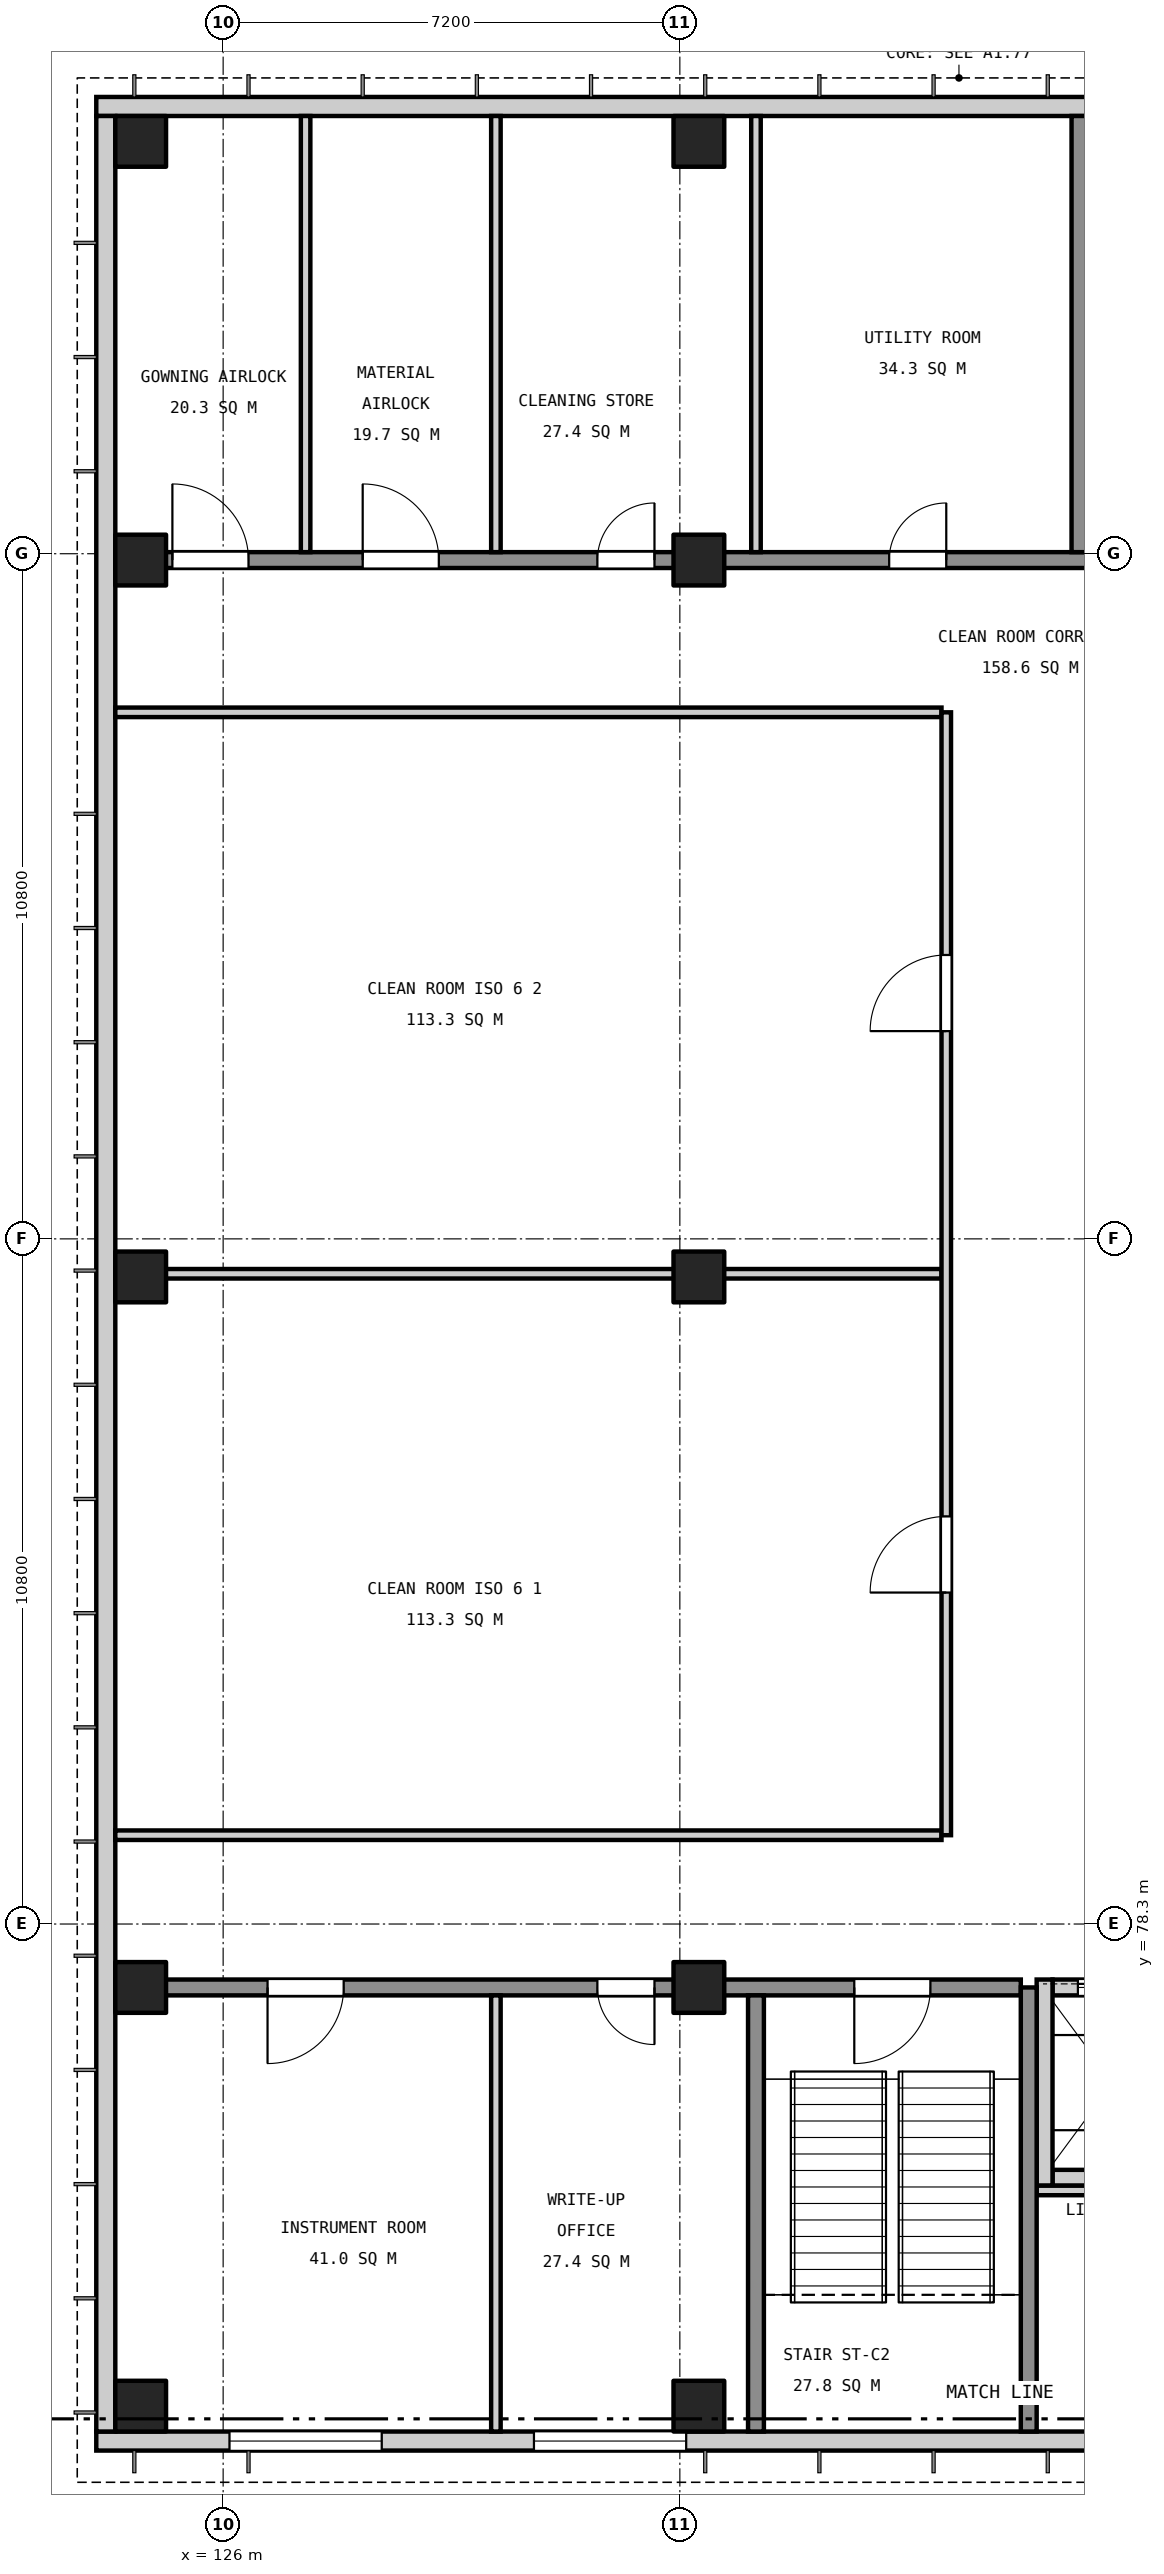
"""IFC4 building model, lengths in metres.
Left out: names, types, materials, properties, quantities, classifications, styles, units other than length and angle.
Written with IfcOpenShell. Run it as: python <this file> out.ifc"""

import sys

from ifc_helpers import new_model, si_unit, direction, frame, frame_2d, origin, origin_2d, place, context, subcontext, project, spatial, rectangle, extrude, element, fill, save


model = new_model("IFC4")
c1 = context("Model", 3, precision=1e-05, world=origin(), true_north=direction((0.0, 1.0)))
c2 = subcontext(c1, "Body", "Model", "MODEL_VIEW")
j1 = project(units=[si_unit("LENGTHUNIT", "METRE"), si_unit("PLANEANGLEUNIT", "RADIAN")], contexts=[c1])
p1 = place(None, origin())
s1 = spatial("IfcSite", under=j1, at=p1, CompositionType="ELEMENT")
p2 = place(p1, origin())
s2 = spatial("IfcBuilding", under=s1, at=p2, CompositionType="ELEMENT")
p3 = place(p2, frame((0.0, 0.0, 6.0)))
s3 = spatial("IfcBuildingStorey", under=s2, at=p3, CompositionType="ELEMENT", Elevation=6.0)
p4 = place(p3, frame((139.075, 74.3, 0.0), z_axis=(0.0, 0.0, 1.0), x_axis=(1.0, 0.0, 0.0)))
e1 = element("IfcWall", 1, at=p4, inside=s3, PredefinedType="SOLIDWALL", context=c2, shape_type="SweptSolid", body=[
    extrude(rectangle(XDim=1.9, YDim=0.25, at=frame_2d((0.95, 0.0))), origin(), (0.0, 0.0, 1.0), 4.95),
])
p5 = place(p3, frame((139.075, 77.3, 0.0), z_axis=(0.0, 0.0, 1.0), x_axis=(1.0, 0.0, 0.0)))
e2 = element("IfcWall", 2, at=p5, inside=s3, PredefinedType="SOLIDWALL", context=c2, shape_type="SweptSolid", body=[
    extrude(rectangle(XDim=1.9, YDim=0.25, at=frame_2d((0.95, 0.0))), origin(), (0.0, 0.0, 1.0), 4.95),
])
p6 = place(p5, frame((0.4, 0.0, 0.0)))
e3 = element("IfcOpeningElement", 3, at=p6, cuts=e2, PredefinedType="OPENING", context=c2, shape_type="SweptSolid", body=[
    extrude(rectangle(XDim=1.1, YDim=2.1, at=frame_2d((0.55, 1.05))), frame((0.0, 0.135, 0.0), z_axis=(0.0, -1.0, 0.0), x_axis=(1.0, 0.0, 0.0)), (0.0, 0.0, 1.0), 0.27),
])
p7 = place(p3, frame((138.95, 74.175, 0.0), z_axis=(0.0, 0.0, 1.0), x_axis=(0.0, 1.0, 0.0)))
e4 = element("IfcWall", 4, at=p7, inside=s3, PredefinedType="SOLIDWALL", context=c2, shape_type="SweptSolid", body=[
    extrude(rectangle(XDim=3.25, YDim=0.25, at=frame_2d((1.625, 0.0))), origin(), (0.0, 0.0, 1.0), 4.95),
])
for number, where, z_axis, x_axis in (
    (5, (124.7, 70.7, 0.0), (0.0, 0.0, 1.0), (1.0, 0.0, 0.0)),
    (6, (124.7, 77.3, 0.0), (0.0, 0.0, 1.0), (1.0, 0.0, 0.0)),
    (7, (124.7, 88.5, 0.0), (0.0, 0.0, 1.0), (1.0, 0.0, 0.0)),
    (8, (124.7, 99.8, 0.0), (0.0, 0.0, 1.0), (1.0, 0.0, 0.0)),
    (9, (124.7, 106.4, 0.0), (0.0, 0.0, 1.0), (1.0, 0.0, 0.0)),
    (10, (133.5, 70.7, 0.0), (0.0, 0.0, 1.0), (1.0, 0.0, 0.0)),
    (11, (133.5, 77.3, 0.0), (0.0, 0.0, 1.0), (1.0, 0.0, 0.0)),
    (12, (133.5, 88.5, 0.0), (0.0, 0.0, 1.0), (1.0, 0.0, 0.0)),
    (13, (133.5, 99.8, 0.0), (0.0, 0.0, 1.0), (1.0, 0.0, 0.0)),
    (14, (133.5, 106.4, 0.0), (0.0, 0.0, 1.0), (1.0, 0.0, 0.0)),
):
    element("IfcColumn", number, at=place(p3, frame(where, z_axis=z_axis, x_axis=x_axis)), inside=s3, PredefinedType="COLUMN", context=c2, shape_type="SweptSolid", body=[
        extrude(rectangle(XDim=0.8, YDim=0.8, at=origin_2d()), origin(), (0.0, 0.0, 1.0), 5.4),
    ])
p8 = place(p3, frame((124.0, 70.15, 0.0), z_axis=(0.0, 0.0, 1.0), x_axis=(1.0, 0.0, 0.0)))
e15 = element("IfcWall", 15, at=p8, inside=s3, PredefinedType="SOLIDWALL", context=c2, shape_type="SweptSolid", body=[
    extrude(rectangle(XDim=27.2, YDim=0.3, at=frame_2d((13.6, 0.0))), origin(), (0.0, 0.0, 1.0), 4.95),
])
p9 = place(p8, frame((2.1, 0.0, 0.9)))
e16 = element("IfcOpeningElement", 16, at=p9, cuts=e15, PredefinedType="OPENING", context=c2, shape_type="SweptSolid", body=[
    extrude(rectangle(XDim=2.4, YDim=1.8, at=frame_2d((1.2, 0.9))), frame((0.0, 0.16, 0.0), z_axis=(0.0, -1.0, 0.0), x_axis=(1.0, 0.0, 0.0)), (0.0, 0.0, 1.0), 0.32),
])
p10 = place(p8, frame((6.9, 0.0, 0.9)))
e17 = element("IfcOpeningElement", 17, at=p10, cuts=e15, PredefinedType="OPENING", context=c2, shape_type="SweptSolid", body=[
    extrude(rectangle(XDim=2.4, YDim=1.8, at=frame_2d((1.2, 0.9))), frame((0.0, 0.16, 0.0), z_axis=(0.0, -1.0, 0.0), x_axis=(1.0, 0.0, 0.0)), (0.0, 0.0, 1.0), 0.32),
])
p11 = place(p8, frame((20.6, 0.0, 0.9)))
e18 = element("IfcOpeningElement", 18, at=p11, cuts=e15, PredefinedType="OPENING", context=c2, shape_type="SweptSolid", body=[
    extrude(rectangle(XDim=2.4, YDim=1.8, at=frame_2d((1.2, 0.9))), frame((0.0, 0.16, 0.0), z_axis=(0.0, -1.0, 0.0), x_axis=(1.0, 0.0, 0.0)), (0.0, 0.0, 1.0), 0.32),
])
p12 = place(p3, frame((124.0, 106.95, 0.0), z_axis=(0.0, 0.0, 1.0), x_axis=(1.0, 0.0, 0.0)))
e19 = element("IfcWall", 19, at=p12, inside=s3, PredefinedType="SOLIDWALL", context=c2, shape_type="SweptSolid", body=[
    extrude(rectangle(XDim=27.2, YDim=0.3, at=frame_2d((13.6, 0.0))), origin(), (0.0, 0.0, 1.0), 4.95),
])
p13 = place(p3, frame((124.15, 70.3, 0.0), z_axis=(0.0, 0.0, 1.0), x_axis=(0.0, 1.0, 0.0)))
e20 = element("IfcWall", 20, at=p13, inside=s3, PredefinedType="SOLIDWALL", context=c2, shape_type="SweptSolid", body=[
    extrude(rectangle(XDim=36.5, YDim=0.3, at=frame_2d((18.25, 0.0))), origin(), (0.0, 0.0, 1.0), 4.95),
])
p14 = place(p3, frame((138.825, 74.1, 0.0), z_axis=(0.0, 0.0, 1.0), x_axis=(1.0, 0.0, 0.0)))
e21 = element("IfcWall", 21, at=p14, inside=s3, PredefinedType="SOLIDWALL", context=c2, shape_type="SweptSolid", body=[
    extrude(rectangle(XDim=4.9, YDim=0.15, at=frame_2d((2.45, 0.0))), origin(), (0.0, 0.0, 1.0), 4.95),
])
p15 = place(p3, frame((124.3, 77.3, 0.0), z_axis=(0.0, 0.0, 1.0), x_axis=(1.0, 0.0, 0.0)))
e22 = element("IfcWall", 22, at=p15, inside=s3, PredefinedType="SOLIDWALL", context=c2, shape_type="SweptSolid", body=[
    extrude(rectangle(XDim=14.275, YDim=0.25, at=frame_2d((7.137, 0.0))), origin(), (0.0, 0.0, 1.0), 4.95),
])
p16 = place(p15, frame((2.4, 0.0, 0.0)))
e23 = element("IfcOpeningElement", 23, at=p16, cuts=e22, PredefinedType="OPENING", context=c2, shape_type="SweptSolid", body=[
    extrude(rectangle(XDim=1.2, YDim=2.1, at=frame_2d((0.6, 1.05))), frame((0.0, 0.135, 0.0), z_axis=(0.0, -1.0, 0.0), x_axis=(1.0, 0.0, 0.0)), (0.0, 0.0, 1.0), 0.27),
])
p17 = place(p15, frame((7.6, 0.0, 0.0)))
e24 = element("IfcOpeningElement", 24, at=p17, cuts=e22, PredefinedType="OPENING", context=c2, shape_type="SweptSolid", body=[
    extrude(rectangle(XDim=0.9, YDim=2.1, at=frame_2d((0.45, 1.05))), frame((0.0, 0.135, 0.0), z_axis=(0.0, -1.0, 0.0), x_axis=(1.0, 0.0, 0.0)), (0.0, 0.0, 1.0), 0.27),
])
p18 = place(p15, frame((11.65, 0.0, 0.0)))
e25 = element("IfcOpeningElement", 25, at=p18, cuts=e22, PredefinedType="OPENING", context=c2, shape_type="SweptSolid", body=[
    extrude(rectangle(XDim=1.2, YDim=2.1, at=frame_2d((0.6, 1.05))), frame((0.0, 0.135, 0.0), z_axis=(0.0, -1.0, 0.0), x_axis=(1.0, 0.0, 0.0)), (0.0, 0.0, 1.0), 0.27),
])
for number, where, z_axis, x_axis in (
    (26, (124.3, 79.7, 0.0), (0.0, 0.0, 1.0), (1.0, 0.0, 0.0)),
    (27, (124.3, 88.55, 0.0), (0.0, 0.0, 1.0), (1.0, 0.0, 0.0)),
    (28, (124.3, 97.4, 0.0), (0.0, 0.0, 1.0), (1.0, 0.0, 0.0)),
):
    element("IfcWall", number, at=place(p3, frame(where, z_axis=z_axis, x_axis=x_axis)), inside=s3, PredefinedType="SOLIDWALL", context=c2, shape_type="SweptSolid", body=[
        extrude(rectangle(XDim=13.025, YDim=0.15, at=frame_2d((6.512, 0.0))), origin(), (0.0, 0.0, 1.0), 4.95),
    ])
p19 = place(p3, frame((124.3, 99.8, 0.0), z_axis=(0.0, 0.0, 1.0), x_axis=(1.0, 0.0, 0.0)))
e29 = element("IfcWall", 29, at=p19, inside=s3, PredefinedType="SOLIDWALL", context=c2, shape_type="SweptSolid", body=[
    extrude(rectangle(XDim=26.6, YDim=0.25, at=frame_2d((13.3, 0.0))), origin(), (0.0, 0.0, 1.0), 4.95),
])
p20 = place(p19, frame((0.9, 0.0, 0.0)))
e30 = element("IfcOpeningElement", 30, at=p20, cuts=e29, PredefinedType="OPENING", context=c2, shape_type="SweptSolid", body=[
    extrude(rectangle(XDim=1.2, YDim=2.1, at=frame_2d((0.6, 1.05))), frame((0.0, 0.135, 0.0), z_axis=(0.0, -1.0, 0.0), x_axis=(1.0, 0.0, 0.0)), (0.0, 0.0, 1.0), 0.27),
])
p21 = place(p19, frame((3.9, 0.0, 0.0)))
e31 = element("IfcOpeningElement", 31, at=p21, cuts=e29, PredefinedType="OPENING", context=c2, shape_type="SweptSolid", body=[
    extrude(rectangle(XDim=1.2, YDim=2.1, at=frame_2d((0.6, 1.05))), frame((0.0, 0.135, 0.0), z_axis=(0.0, -1.0, 0.0), x_axis=(1.0, 0.0, 0.0)), (0.0, 0.0, 1.0), 0.27),
])
p22 = place(p19, frame((7.6, 0.0, 0.0)))
e32 = element("IfcOpeningElement", 32, at=p22, cuts=e29, PredefinedType="OPENING", context=c2, shape_type="SweptSolid", body=[
    extrude(rectangle(XDim=0.9, YDim=2.1, at=frame_2d((0.45, 1.05))), frame((0.0, 0.135, 0.0), z_axis=(0.0, -1.0, 0.0), x_axis=(1.0, 0.0, 0.0)), (0.0, 0.0, 1.0), 0.27),
])
p23 = place(p19, frame((20.8, 0.0, 0.0)))
e33 = element("IfcOpeningElement", 33, at=p23, cuts=e29, PredefinedType="OPENING", context=c2, shape_type="SweptSolid", body=[
    extrude(rectangle(XDim=0.9, YDim=2.1, at=frame_2d((0.45, 1.05))), frame((0.0, 0.135, 0.0), z_axis=(0.0, -1.0, 0.0), x_axis=(1.0, 0.0, 0.0)), (0.0, 0.0, 1.0), 0.27),
])
p24 = place(p19, frame((24.35, 0.0, 0.0)))
e34 = element("IfcOpeningElement", 34, at=p24, cuts=e29, PredefinedType="OPENING", context=c2, shape_type="SweptSolid", body=[
    extrude(rectangle(XDim=0.9, YDim=2.1, at=frame_2d((0.45, 1.05))), frame((0.0, 0.135, 0.0), z_axis=(0.0, -1.0, 0.0), x_axis=(1.0, 0.0, 0.0)), (0.0, 0.0, 1.0), 0.27),
])
p25 = place(p19, frame((12.2, 0.0, 0.0)))
e35 = element("IfcOpeningElement", 35, at=p25, cuts=e29, PredefinedType="OPENING", context=c2, shape_type="SweptSolid", body=[
    extrude(rectangle(XDim=0.9, YDim=2.1, at=frame_2d((0.45, 1.05))), frame((0.0, 0.135, 0.0), z_axis=(0.0, -1.0, 0.0), x_axis=(1.0, 0.0, 0.0)), (0.0, 0.0, 1.0), 0.27),
])
p26 = place(p19, frame((16.75, 0.0, 0.0)))
e36 = element("IfcOpeningElement", 36, at=p26, cuts=e29, PredefinedType="OPENING", context=c2, shape_type="SweptSolid", body=[
    extrude(rectangle(XDim=1.2, YDim=2.1, at=frame_2d((0.6, 1.05))), frame((0.0, 0.135, 0.0), z_axis=(0.0, -1.0, 0.0), x_axis=(1.0, 0.0, 0.0)), (0.0, 0.0, 1.0), 0.27),
])
for number, where, z_axis, x_axis in (
    (37, (127.3, 99.925, 0.0), (0.0, 0.0, 1.0), (0.0, 1.0, 0.0)),
    (38, (130.3, 70.3, 0.0), (0.0, 0.0, 1.0), (0.0, 1.0, 0.0)),
    (39, (130.3, 99.925, 0.0), (0.0, 0.0, 1.0), (0.0, 1.0, 0.0)),
):
    element("IfcWall", number, at=place(p3, frame(where, z_axis=z_axis, x_axis=x_axis)), inside=s3, PredefinedType="SOLIDWALL", context=c2, shape_type="SweptSolid", body=[
        extrude(rectangle(XDim=6.875, YDim=0.15, at=frame_2d((3.438, 0.0))), origin(), (0.0, 0.0, 1.0), 4.95),
    ])
p27 = place(p3, frame((134.4, 70.3, 0.0), z_axis=(0.0, 0.0, 1.0), x_axis=(0.0, 1.0, 0.0)))
e40 = element("IfcWall", 40, at=p27, inside=s3, PredefinedType="SOLIDWALL", context=c2, shape_type="SweptSolid", body=[
    extrude(rectangle(XDim=6.875, YDim=0.25, at=frame_2d((3.438, 0.0))), origin(), (0.0, 0.0, 1.0), 4.95),
])
p28 = place(p3, frame((134.4, 99.925, 0.0), z_axis=(0.0, 0.0, 1.0), x_axis=(0.0, 1.0, 0.0)))
e41 = element("IfcWall", 41, at=p28, inside=s3, PredefinedType="SOLIDWALL", context=c2, shape_type="SweptSolid", body=[
    extrude(rectangle(XDim=6.875, YDim=0.15, at=frame_2d((3.438, 0.0))), origin(), (0.0, 0.0, 1.0), 4.95),
])
p29 = place(p3, frame((137.4, 79.7, 0.0), z_axis=(0.0, 0.0, 1.0), x_axis=(0.0, 1.0, 0.0)))
e42 = element("IfcWall", 42, at=p29, inside=s3, PredefinedType="SOLIDWALL", context=c2, shape_type="SweptSolid", body=[
    extrude(rectangle(XDim=17.7, YDim=0.15, at=frame_2d((8.85, 0.0))), origin(), (0.0, 0.0, 1.0), 4.95),
])
p30 = place(p29, frame((3.825, 0.0, 0.0)))
e43 = element("IfcOpeningElement", 43, at=p30, cuts=e42, PredefinedType="OPENING", context=c2, shape_type="SweptSolid", body=[
    extrude(rectangle(XDim=1.2, YDim=2.1, at=frame_2d((0.6, 1.05))), frame((0.0, 0.085, 0.0), z_axis=(0.0, -1.0, 0.0), x_axis=(1.0, 0.0, 0.0)), (0.0, 0.0, 1.0), 0.17),
])
p31 = place(p29, frame((12.675, 0.0, 0.0)))
e44 = element("IfcOpeningElement", 44, at=p31, cuts=e42, PredefinedType="OPENING", context=c2, shape_type="SweptSolid", body=[
    extrude(rectangle(XDim=1.2, YDim=2.1, at=frame_2d((0.6, 1.05))), frame((0.0, 0.085, 0.0), z_axis=(0.0, -1.0, 0.0), x_axis=(1.0, 0.0, 0.0)), (0.0, 0.0, 1.0), 0.17),
])
p32 = place(p3, frame((138.7, 70.3, 0.0), z_axis=(0.0, 0.0, 1.0), x_axis=(0.0, 1.0, 0.0)))
e45 = element("IfcWall", 45, at=p32, inside=s3, PredefinedType="SOLIDWALL", context=c2, shape_type="SweptSolid", body=[
    extrude(rectangle(XDim=7.0, YDim=0.25, at=frame_2d((3.5, 0.0))), origin(), (0.0, 0.0, 1.0), 4.95),
])
p33 = place(p3, frame((139.5, 99.925, 0.0), z_axis=(0.0, 0.0, 1.0), x_axis=(0.0, 1.0, 0.0)))
e46 = element("IfcWall", 46, at=p33, inside=s3, PredefinedType="SOLIDWALL", context=c2, shape_type="SweptSolid", body=[
    extrude(rectangle(XDim=6.875, YDim=0.25, at=frame_2d((3.438, 0.0))), origin(), (0.0, 0.0, 1.0), 4.95),
])
p34 = place(p16, frame((1.2, 0.0, 0.0), z_axis=(0.0, 0.0, 1.0), x_axis=(-1.0, 0.0, 0.0)))
e47 = element("IfcDoor", 47, at=p34, inside=s3, OperationType="SINGLE_SWING_RIGHT", PredefinedType="DOOR", context=c2, shape_type="SweptSolid", body=[
    extrude(rectangle(XDim=1.2, YDim=2.1, at=frame_2d((0.6, 1.05))), frame((0.0, 0.025, 0.0), z_axis=(0.0, -1.0, 0.0), x_axis=(1.0, 0.0, 0.0)), (0.0, 0.0, 1.0), 0.05),
])
fill(e23, e47)
p35 = place(p17, frame((0.9, 0.0, 0.0), z_axis=(0.0, 0.0, 1.0), x_axis=(-1.0, 0.0, 0.0)))
e48 = element("IfcDoor", 48, at=p35, inside=s3, OperationType="SINGLE_SWING_LEFT", PredefinedType="DOOR", context=c2, shape_type="SweptSolid", body=[
    extrude(rectangle(XDim=0.9, YDim=2.1, at=frame_2d((0.45, 1.05))), frame((0.0, 0.025, 0.0), z_axis=(0.0, -1.0, 0.0), x_axis=(1.0, 0.0, 0.0)), (0.0, 0.0, 1.0), 0.05),
])
fill(e24, e48)
p36 = place(p30, origin())
e49 = element("IfcDoor", 49, at=p36, inside=s3, OperationType="SINGLE_SWING_LEFT", PredefinedType="DOOR", context=c2, shape_type="SweptSolid", body=[
    extrude(rectangle(XDim=1.2, YDim=2.1, at=frame_2d((0.6, 1.05))), frame((0.0, 0.025, 0.0), z_axis=(0.0, -1.0, 0.0), x_axis=(1.0, 0.0, 0.0)), (0.0, 0.0, 1.0), 0.05),
])
fill(e43, e49)
p37 = place(p31, origin())
e50 = element("IfcDoor", 50, at=p37, inside=s3, OperationType="SINGLE_SWING_LEFT", PredefinedType="DOOR", context=c2, shape_type="SweptSolid", body=[
    extrude(rectangle(XDim=1.2, YDim=2.1, at=frame_2d((0.6, 1.05))), frame((0.0, 0.025, 0.0), z_axis=(0.0, -1.0, 0.0), x_axis=(1.0, 0.0, 0.0)), (0.0, 0.0, 1.0), 0.05),
])
fill(e44, e50)
p38 = place(p20, origin())
e51 = element("IfcDoor", 51, at=p38, inside=s3, OperationType="SINGLE_SWING_LEFT", PredefinedType="DOOR", context=c2, shape_type="SweptSolid", body=[
    extrude(rectangle(XDim=1.2, YDim=2.1, at=frame_2d((0.6, 1.05))), frame((0.0, 0.025, 0.0), z_axis=(0.0, -1.0, 0.0), x_axis=(1.0, 0.0, 0.0)), (0.0, 0.0, 1.0), 0.05),
])
fill(e30, e51)
p39 = place(p21, origin())
e52 = element("IfcDoor", 52, at=p39, inside=s3, OperationType="SINGLE_SWING_LEFT", PredefinedType="DOOR", context=c2, shape_type="SweptSolid", body=[
    extrude(rectangle(XDim=1.2, YDim=2.1, at=frame_2d((0.6, 1.05))), frame((0.0, 0.025, 0.0), z_axis=(0.0, -1.0, 0.0), x_axis=(1.0, 0.0, 0.0)), (0.0, 0.0, 1.0), 0.05),
])
fill(e31, e52)
p40 = place(p22, origin())
e53 = element("IfcDoor", 53, at=p40, inside=s3, OperationType="SINGLE_SWING_RIGHT", PredefinedType="DOOR", context=c2, shape_type="SweptSolid", body=[
    extrude(rectangle(XDim=0.9, YDim=2.1, at=frame_2d((0.45, 1.05))), frame((0.0, 0.025, 0.0), z_axis=(0.0, -1.0, 0.0), x_axis=(1.0, 0.0, 0.0)), (0.0, 0.0, 1.0), 0.05),
])
fill(e32, e53)
p41 = place(p25, origin())
e54 = element("IfcDoor", 54, at=p41, inside=s3, OperationType="SINGLE_SWING_RIGHT", PredefinedType="DOOR", context=c2, shape_type="SweptSolid", body=[
    extrude(rectangle(XDim=0.9, YDim=2.1, at=frame_2d((0.45, 1.05))), frame((0.0, 0.025, 0.0), z_axis=(0.0, -1.0, 0.0), x_axis=(1.0, 0.0, 0.0)), (0.0, 0.0, 1.0), 0.05),
])
fill(e35, e54)
p42 = place(p18, frame((1.2, 0.0, 0.0), z_axis=(0.0, 0.0, 1.0), x_axis=(-1.0, 0.0, 0.0)))
e55 = element("IfcDoor", 55, at=p42, inside=s3, OperationType="SINGLE_SWING_RIGHT", PredefinedType="DOOR", context=c2, shape_type="SweptSolid", body=[
    extrude(rectangle(XDim=1.2, YDim=2.1, at=frame_2d((0.6, 1.05))), frame((0.0, 0.025, 0.0), z_axis=(0.0, -1.0, 0.0), x_axis=(1.0, 0.0, 0.0)), (0.0, 0.0, 1.0), 0.05),
])
fill(e25, e55)
p43 = place(p6, origin())
e56 = element("IfcDoor", 56, at=p43, inside=s3, OperationType="SLIDING_TO_LEFT", PredefinedType="DOOR", context=c2, shape_type="SweptSolid", body=[
    extrude(rectangle(XDim=1.1, YDim=2.1, at=frame_2d((0.55, 1.05))), frame((0.0, 0.025, 0.0), z_axis=(0.0, -1.0, 0.0), x_axis=(1.0, 0.0, 0.0)), (0.0, 0.0, 1.0), 0.05),
])
fill(e3, e56)
p44 = place(p9, origin())
e57 = element("IfcWindow", 57, at=p44, inside=s3, PartitioningType="SINGLE_PANEL", PredefinedType="WINDOW", context=c2, shape_type="SweptSolid", body=[
    extrude(rectangle(XDim=2.4, YDim=1.8, at=frame_2d((1.2, 0.9))), frame((0.0, 0.03, 0.0), z_axis=(0.0, -1.0, 0.0), x_axis=(1.0, 0.0, 0.0)), (0.0, 0.0, 1.0), 0.06),
])
fill(e16, e57)
p45 = place(p10, origin())
e58 = element("IfcWindow", 58, at=p45, inside=s3, PartitioningType="SINGLE_PANEL", PredefinedType="WINDOW", context=c2, shape_type="SweptSolid", body=[
    extrude(rectangle(XDim=2.4, YDim=1.8, at=frame_2d((1.2, 0.9))), frame((0.0, 0.03, 0.0), z_axis=(0.0, -1.0, 0.0), x_axis=(1.0, 0.0, 0.0)), (0.0, 0.0, 1.0), 0.06),
])
fill(e17, e58)
save(model, sys.argv[1])
